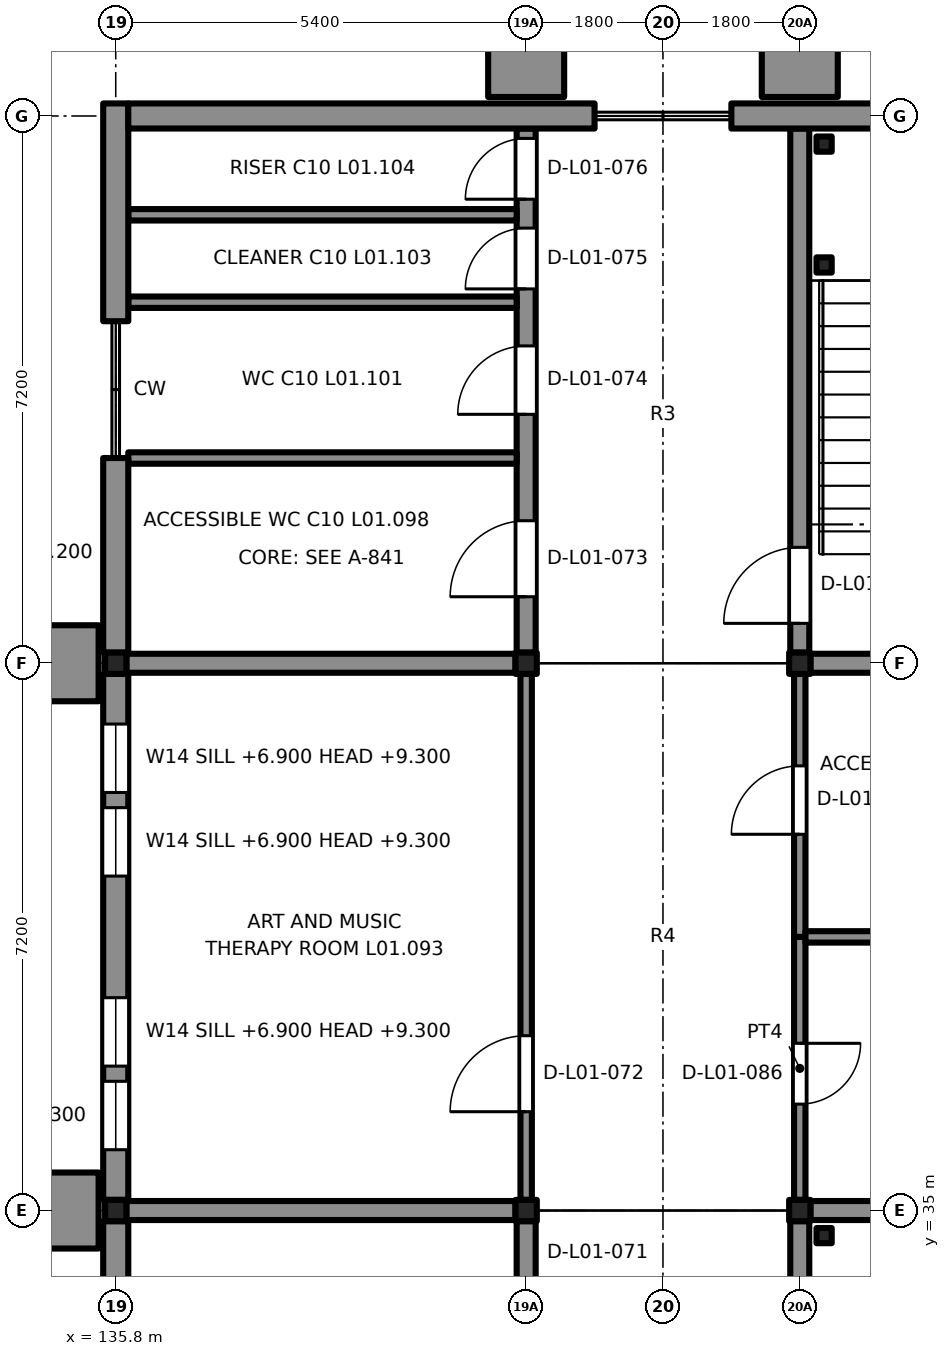
"""IFC4 building model, lengths in metres.
Left out: names, types, materials, properties, quantities, classifications, styles, units other than length and angle.
Written with IfcOpenShell. Run it as: python <this file> out.ifc"""

import sys

from ifc_helpers import new_model, si_unit, direction, frame, frame_2d, origin, origin_2d, place, context, subcontext, project, spatial, rectangle, extrude, element, fill, save


model = new_model("IFC4")
c1 = context("Model", 3, precision=1e-05, world=origin(), true_north=direction((0.0, 1.0)))
c2 = subcontext(c1, "Body", "Model", "MODEL_VIEW")
j1 = project(units=[si_unit("LENGTHUNIT", "METRE"), si_unit("PLANEANGLEUNIT", "RADIAN")], contexts=[c1])
p1 = place(None, origin())
s1 = spatial("IfcSite", under=j1, at=p1, CompositionType="ELEMENT")
p2 = place(p1, origin())
s2 = spatial("IfcBuilding", under=s1, at=p2, CompositionType="ELEMENT")
p3 = place(p2, frame((0.0, 0.0, 6.3)))
s3 = spatial("IfcBuildingStorey", under=s2, at=p3, CompositionType="ELEMENT", Elevation=6.3)
for number, where, z_axis, x_axis in (
    (1, (135.8, 35.0, 0.0), (0.0, 0.0, 1.0), (1.0, 0.0, 0.0)),
    (2, (141.2, 35.0, 0.0), (0.0, 0.0, 1.0), (1.0, 0.0, 0.0)),
    (3, (144.8, 35.0, 0.0), (0.0, 0.0, 1.0), (1.0, 0.0, 0.0)),
    (4, (135.8, 42.2, 0.0), (0.0, 0.0, 1.0), (1.0, 0.0, 0.0)),
    (5, (141.2, 42.2, 0.0), (0.0, 0.0, 1.0), (1.0, 0.0, 0.0)),
    (6, (144.8, 42.2, 0.0), (0.0, 0.0, 1.0), (1.0, 0.0, 0.0)),
):
    element("IfcColumn", number, at=place(p3, frame(where, z_axis=z_axis, x_axis=x_axis)), inside=s3, PredefinedType="COLUMN", context=c2, shape_type="SweptSolid", body=[
        extrude(rectangle(XDim=0.28, YDim=0.28, at=origin_2d()), origin(), (0.0, 0.0, 1.0), 3.9),
    ])
p4 = place(p3, frame((144.8, 27.94, 0.0), z_axis=(0.0, 0.0, 1.0), x_axis=(0.0, 1.0, 0.0)))
e7 = element("IfcWall", 7, at=p4, inside=s3, PredefinedType="SHEAR", context=c2, shape_type="SweptSolid", body=[
    extrude(rectangle(XDim=6.92, YDim=0.25, at=frame_2d((3.46, 0.0))), origin(), (0.0, 0.0, 1.0), 3.65),
])
p5 = place(p4, frame((0.335, 0.0, 0.0)))
e8 = element("IfcOpeningElement", 8, at=p5, cuts=e7, PredefinedType="OPENING", context=c2, shape_type="SweptSolid", body=[
    extrude(rectangle(XDim=1.0, YDim=2.1, at=frame_2d((0.5, 1.05))), frame((0.0, 0.135, 0.0), z_axis=(0.0, -1.0, 0.0), x_axis=(1.0, 0.0, 0.0)), (0.0, 0.0, 1.0), 0.27),
])
p6 = place(p3, frame((144.94, 35.0, 0.0), z_axis=(0.0, 0.0, 1.0), x_axis=(1.0, 0.0, 0.0)))
e9 = element("IfcWall", 9, at=p6, inside=s3, PredefinedType="SHEAR", context=c2, shape_type="SweptSolid", body=[
    extrude(rectangle(XDim=5.12, YDim=0.25, at=frame_2d((2.56, 0.0))), origin(), (0.0, 0.0, 1.0), 3.65),
])
p7 = place(p3, frame((141.2, 27.94, 0.0), z_axis=(0.0, 0.0, 1.0), x_axis=(0.0, 1.0, 0.0)))
e10 = element("IfcWall", 10, at=p7, inside=s3, PredefinedType="SHEAR", context=c2, shape_type="SweptSolid", body=[
    extrude(rectangle(XDim=6.92, YDim=0.25, at=frame_2d((3.46, 0.0))), origin(), (0.0, 0.0, 1.0), 3.65),
])
p8 = place(p7, frame((4.16, 0.0, 0.0)))
e11 = element("IfcOpeningElement", 11, at=p8, cuts=e10, PredefinedType="OPENING", context=c2, shape_type="SweptSolid", body=[
    extrude(rectangle(XDim=1.8, YDim=2.1, at=frame_2d((0.9, 1.05))), frame((0.0, 0.135, 0.0), z_axis=(0.0, -1.0, 0.0), x_axis=(1.0, 0.0, 0.0)), (0.0, 0.0, 1.0), 0.27),
])
p9 = place(p3, frame((135.94, 35.0, 0.0), z_axis=(0.0, 0.0, 1.0), x_axis=(1.0, 0.0, 0.0)))
e12 = element("IfcWall", 12, at=p9, inside=s3, PredefinedType="SHEAR", context=c2, shape_type="SweptSolid", body=[
    extrude(rectangle(XDim=5.12, YDim=0.25, at=frame_2d((2.56, 0.0))), origin(), (0.0, 0.0, 1.0), 3.65),
])
p10 = place(p3, frame((145.12, 34.67, 0.0), z_axis=(0.0, 0.0, 1.0), x_axis=(1.0, 0.0, 0.0)))
e13 = element("IfcColumn", 13, at=p10, inside=s3, PredefinedType="COLUMN", context=c2, shape_type="SweptSolid", body=[
    extrude(rectangle(XDim=0.2, YDim=0.2, at=origin_2d()), origin(), (0.0, 0.0, 1.0), 1.75),
])
p11 = place(p3, frame((144.8, 42.34, 0.0), z_axis=(0.0, 0.0, 1.0), x_axis=(0.0, 1.0, 0.0)))
e14 = element("IfcWall", 14, at=p11, inside=s3, PredefinedType="SHEAR", context=c2, shape_type="SweptSolid", body=[
    extrude(rectangle(XDim=6.895, YDim=0.25, at=frame_2d((3.448, 0.0))), origin(), (0.0, 0.0, 1.0), 3.65),
])
p12 = place(p11, frame((0.385, 0.0, 0.0)))
e15 = element("IfcOpeningElement", 15, at=p12, cuts=e14, PredefinedType="OPENING", context=c2, shape_type="SweptSolid", body=[
    extrude(rectangle(XDim=1.0, YDim=2.1, at=frame_2d((0.5, 1.05))), frame((0.0, 0.135, 0.0), z_axis=(0.0, -1.0, 0.0), x_axis=(1.0, 0.0, 0.0)), (0.0, 0.0, 1.0), 0.27),
])
p13 = place(p3, frame((144.94, 42.2, 0.0), z_axis=(0.0, 0.0, 1.0), x_axis=(1.0, 0.0, 0.0)))
e16 = element("IfcWall", 16, at=p13, inside=s3, PredefinedType="SHEAR", context=c2, shape_type="SweptSolid", body=[
    extrude(rectangle(XDim=5.12, YDim=0.25, at=frame_2d((2.56, 0.0))), origin(), (0.0, 0.0, 1.0), 3.65),
])
p14 = place(p3, frame((141.2, 42.34, 0.0), z_axis=(0.0, 0.0, 1.0), x_axis=(0.0, 1.0, 0.0)))
e17 = element("IfcWall", 17, at=p14, inside=s3, PredefinedType="SHEAR", context=c2, shape_type="SweptSolid", body=[
    extrude(rectangle(XDim=6.895, YDim=0.25, at=frame_2d((3.448, 0.0))), origin(), (0.0, 0.0, 1.0), 3.65),
])
p15 = place(p14, frame((0.735, 0.0, 0.0)))
e18 = element("IfcOpeningElement", 18, at=p15, cuts=e17, PredefinedType="OPENING", context=c2, shape_type="SweptSolid", body=[
    extrude(rectangle(XDim=1.0, YDim=2.1, at=frame_2d((0.5, 1.05))), frame((0.0, 0.135, 0.0), z_axis=(0.0, -1.0, 0.0), x_axis=(1.0, 0.0, 0.0)), (0.0, 0.0, 1.0), 0.27),
])
p16 = place(p14, frame((3.135, 0.0, 0.0)))
e19 = element("IfcOpeningElement", 19, at=p16, cuts=e17, PredefinedType="OPENING", context=c2, shape_type="SweptSolid", body=[
    extrude(rectangle(XDim=0.9, YDim=2.1, at=frame_2d((0.45, 1.05))), frame((0.0, 0.135, 0.0), z_axis=(0.0, -1.0, 0.0), x_axis=(1.0, 0.0, 0.0)), (0.0, 0.0, 1.0), 0.27),
])
p17 = place(p14, frame((4.785, 0.0, 0.0)))
e20 = element("IfcOpeningElement", 20, at=p17, cuts=e17, PredefinedType="OPENING", context=c2, shape_type="SweptSolid", body=[
    extrude(rectangle(XDim=0.8, YDim=2.1, at=frame_2d((0.4, 1.05))), frame((0.0, 0.135, 0.0), z_axis=(0.0, -1.0, 0.0), x_axis=(1.0, 0.0, 0.0)), (0.0, 0.0, 1.0), 0.27),
])
p18 = place(p14, frame((5.965, 0.0, 0.0)))
e21 = element("IfcOpeningElement", 21, at=p18, cuts=e17, PredefinedType="OPENING", context=c2, shape_type="SweptSolid", body=[
    extrude(rectangle(XDim=0.8, YDim=2.1, at=frame_2d((0.4, 1.05))), frame((0.0, 0.135, 0.0), z_axis=(0.0, -1.0, 0.0), x_axis=(1.0, 0.0, 0.0)), (0.0, 0.0, 1.0), 0.27),
])
p19 = place(p3, frame((135.94, 42.2, 0.0), z_axis=(0.0, 0.0, 1.0), x_axis=(1.0, 0.0, 0.0)))
e22 = element("IfcWall", 22, at=p19, inside=s3, PredefinedType="SHEAR", context=c2, shape_type="SweptSolid", body=[
    extrude(rectangle(XDim=5.12, YDim=0.25, at=frame_2d((2.56, 0.0))), origin(), (0.0, 0.0, 1.0), 3.65),
])
for number, where, z_axis, x_axis in (
    (23, (135.965, 44.9, 0.0), (0.0, 0.0, 1.0), (1.0, 0.0, 0.0)),
    (24, (135.965, 46.95, 0.0), (0.0, 0.0, 1.0), (1.0, 0.0, 0.0)),
    (25, (135.965, 48.1, 0.0), (0.0, 0.0, 1.0), (1.0, 0.0, 0.0)),
):
    element("IfcWall", number, at=place(p3, frame(where, z_axis=z_axis, x_axis=x_axis)), inside=s3, PredefinedType="PARTITIONING", context=c2, shape_type="SweptSolid", body=[
        extrude(rectangle(XDim=5.11, YDim=0.15, at=frame_2d((2.555, 0.0))), origin(), (0.0, 0.0, 1.0), 3.65),
    ])
for number, where, z_axis, x_axis in (
    (26, (145.12, 49.03, 0.0), (0.0, 0.0, 1.0), (1.0, 0.0, 0.0)),
    (27, (145.12, 47.44, 0.0), (0.0, 0.0, 1.0), (1.0, 0.0, 0.0)),
):
    element("IfcColumn", number, at=place(p3, frame(where, z_axis=z_axis, x_axis=x_axis)), inside=s3, PredefinedType="COLUMN", context=c2, shape_type="SweptSolid", body=[
        extrude(rectangle(XDim=0.2, YDim=0.2, at=origin_2d()), origin(), (0.0, 0.0, 1.0), 1.75),
    ])
p20 = place(p3, frame((135.8, 27.94, 0.0), z_axis=(0.0, 0.0, 1.0), x_axis=(0.0, 1.0, 0.0)))
e28 = element("IfcWall", 28, at=p20, inside=s3, PredefinedType="SOLIDWALL", context=c2, shape_type="SweptSolid", body=[
    extrude(rectangle(XDim=6.92, YDim=0.33, at=frame_2d((3.46, 0.0))), origin(), (0.0, 0.0, 1.0), 3.22),
])
p21 = place(p3, frame((135.8, 35.14, 0.0), z_axis=(0.0, 0.0, 1.0), x_axis=(0.0, 1.0, 0.0)))
e29 = element("IfcWall", 29, at=p21, inside=s3, PredefinedType="SOLIDWALL", context=c2, shape_type="SweptSolid", body=[
    extrude(rectangle(XDim=6.92, YDim=0.33, at=frame_2d((3.46, 0.0))), origin(), (0.0, 0.0, 1.0), 3.22),
])
p22 = place(p21, frame((0.66, 0.0, 0.6)))
e30 = element("IfcOpeningElement", 30, at=p22, cuts=e29, PredefinedType="OPENING", context=c2, shape_type="SweptSolid", body=[
    extrude(rectangle(XDim=0.9, YDim=2.4, at=frame_2d((0.45, 1.2))), frame((0.0, 0.175, 0.0), z_axis=(0.0, -1.0, 0.0), x_axis=(1.0, 0.0, 0.0)), (0.0, 0.0, 1.0), 0.35),
])
p23 = place(p21, frame((1.76, 0.0, 0.6)))
e31 = element("IfcOpeningElement", 31, at=p23, cuts=e29, PredefinedType="OPENING", context=c2, shape_type="SweptSolid", body=[
    extrude(rectangle(XDim=0.9, YDim=2.4, at=frame_2d((0.45, 1.2))), frame((0.0, 0.175, 0.0), z_axis=(0.0, -1.0, 0.0), x_axis=(1.0, 0.0, 0.0)), (0.0, 0.0, 1.0), 0.35),
])
p24 = place(p21, frame((4.26, 0.0, 0.6)))
e32 = element("IfcOpeningElement", 32, at=p24, cuts=e29, PredefinedType="OPENING", context=c2, shape_type="SweptSolid", body=[
    extrude(rectangle(XDim=0.9, YDim=2.4, at=frame_2d((0.45, 1.2))), frame((0.0, 0.175, 0.0), z_axis=(0.0, -1.0, 0.0), x_axis=(1.0, 0.0, 0.0)), (0.0, 0.0, 1.0), 0.35),
])
p25 = place(p21, frame((5.36, 0.0, 0.6)))
e33 = element("IfcOpeningElement", 33, at=p25, cuts=e29, PredefinedType="OPENING", context=c2, shape_type="SweptSolid", body=[
    extrude(rectangle(XDim=0.9, YDim=2.4, at=frame_2d((0.45, 1.2))), frame((0.0, 0.175, 0.0), z_axis=(0.0, -1.0, 0.0), x_axis=(1.0, 0.0, 0.0)), (0.0, 0.0, 1.0), 0.35),
])
p26 = place(p3, frame((135.8, 42.34, 0.0), z_axis=(0.0, 0.0, 1.0), x_axis=(0.0, 1.0, 0.0)))
e34 = element("IfcWall", 34, at=p26, inside=s3, PredefinedType="SOLIDWALL", context=c2, shape_type="SweptSolid", body=[
    extrude(rectangle(XDim=2.56, YDim=0.33, at=frame_2d((1.28, 0.0))), origin(), (0.0, 0.0, 1.0), 3.22),
])
p27 = place(p3, frame((135.8, 46.7, 0.0), z_axis=(0.0, 0.0, 1.0), x_axis=(0.0, 1.0, 0.0)))
e35 = element("IfcWall", 35, at=p27, inside=s3, PredefinedType="SOLIDWALL", context=c2, shape_type="SweptSolid", body=[
    extrude(rectangle(XDim=2.865, YDim=0.33, at=frame_2d((1.433, 0.0))), origin(), (0.0, 0.0, 1.0), 3.22),
])
for number, where, z_axis, x_axis in (
    (36, (135.2, 34.5, 0.0), (0.0, 0.0, 1.0), (0.0, 1.0, 0.0)),
    (37, (135.2, 41.7, 0.0), (0.0, 0.0, 1.0), (0.0, 1.0, 0.0)),
):
    element("IfcWall", number, at=place(p3, frame(where, z_axis=z_axis, x_axis=x_axis)), inside=s3, PredefinedType="SOLIDWALL", context=c2, shape_type="SweptSolid", body=[
        extrude(rectangle(XDim=1.0, YDim=0.75, at=frame_2d((0.5, 0.0))), origin(), (0.0, 0.0, 1.0), 3.9),
    ])
p28 = place(p3, frame((135.965, 49.4, 0.0), z_axis=(0.0, 0.0, 1.0), x_axis=(1.0, 0.0, 0.0)))
e38 = element("IfcWall", 38, at=p28, inside=s3, PredefinedType="SOLIDWALL", context=c2, shape_type="SweptSolid", body=[
    extrude(rectangle(XDim=6.135, YDim=0.33, at=frame_2d((3.067, 0.0))), origin(), (0.0, 0.0, 1.0), 3.2),
])
p29 = place(p3, frame((143.9, 49.4, 0.0), z_axis=(0.0, 0.0, 1.0), x_axis=(1.0, 0.0, 0.0)))
e39 = element("IfcWall", 39, at=p29, inside=s3, PredefinedType="SOLIDWALL", context=c2, shape_type="SweptSolid", body=[
    extrude(rectangle(XDim=2.98, YDim=0.33, at=frame_2d((1.49, 0.0))), origin(), (0.0, 0.0, 1.0), 3.2),
])
for number, where, z_axis, x_axis in (
    (40, (140.7, 50.025, 0.0), (0.0, 0.0, 1.0), (1.0, 0.0, 0.0)),
    (41, (144.3, 50.025, 0.0), (0.0, 0.0, 1.0), (1.0, 0.0, 0.0)),
):
    element("IfcWall", number, at=place(p3, frame(where, z_axis=z_axis, x_axis=x_axis)), inside=s3, PredefinedType="SOLIDWALL", context=c2, shape_type="SweptSolid", body=[
        extrude(rectangle(XDim=1.0, YDim=0.75, at=frame_2d((0.5, 0.0))), origin(), (0.0, 0.0, 1.0), 3.9),
    ])
p30 = place(p3, frame((141.2, 35.14, 0.0), z_axis=(0.0, 0.0, 1.0), x_axis=(0.0, 1.0, 0.0)))
e42 = element("IfcWall", 42, at=p30, inside=s3, PredefinedType="PARTITIONING", context=c2, shape_type="SweptSolid", body=[
    extrude(rectangle(XDim=6.92, YDim=0.15, at=frame_2d((3.46, 0.0))), origin(), (0.0, 0.0, 1.0), 3.22),
])
p31 = place(p30, frame((1.16, 0.0, 0.0)))
e43 = element("IfcOpeningElement", 43, at=p31, cuts=e42, PredefinedType="OPENING", context=c2, shape_type="SweptSolid", body=[
    extrude(rectangle(XDim=1.0, YDim=2.1, at=frame_2d((0.5, 1.05))), frame((0.0, 0.085, 0.0), z_axis=(0.0, -1.0, 0.0), x_axis=(1.0, 0.0, 0.0)), (0.0, 0.0, 1.0), 0.17),
])
p32 = place(p3, frame((144.8, 38.6, 0.0), z_axis=(0.0, 0.0, 1.0), x_axis=(0.0, -1.0, 0.0)))
e44 = element("IfcWall", 44, at=p32, inside=s3, PredefinedType="PARTITIONING", context=c2, shape_type="SweptSolid", body=[
    extrude(rectangle(XDim=3.46, YDim=0.15, at=frame_2d((1.73, 0.0))), origin(), (0.0, 0.0, 1.0), 3.22),
])
p33 = place(p32, frame((1.4, 0.0, 0.0)))
e45 = element("IfcOpeningElement", 45, at=p33, cuts=e44, PredefinedType="OPENING", context=c2, shape_type="SweptSolid", body=[
    extrude(rectangle(XDim=0.8, YDim=2.1, at=frame_2d((0.4, 1.05))), frame((0.0, 0.085, 0.0), z_axis=(0.0, -1.0, 0.0), x_axis=(1.0, 0.0, 0.0)), (0.0, 0.0, 1.0), 0.17),
])
p34 = place(p3, frame((144.8, 38.6, 0.0), z_axis=(0.0, 0.0, 1.0), x_axis=(0.0, 1.0, 0.0)))
e46 = element("IfcWall", 46, at=p34, inside=s3, PredefinedType="PARTITIONING", context=c2, shape_type="SweptSolid", body=[
    extrude(rectangle(XDim=3.46, YDim=0.15, at=frame_2d((1.73, 0.0))), origin(), (0.0, 0.0, 1.0), 3.22),
])
p35 = place(p34, frame((1.35, 0.0, 0.0)))
e47 = element("IfcOpeningElement", 47, at=p35, cuts=e46, PredefinedType="OPENING", context=c2, shape_type="SweptSolid", body=[
    extrude(rectangle(XDim=0.9, YDim=2.1, at=frame_2d((0.45, 1.05))), frame((0.0, 0.085, 0.0), z_axis=(0.0, -1.0, 0.0), x_axis=(1.0, 0.0, 0.0)), (0.0, 0.0, 1.0), 0.17),
])
p36 = place(p3, frame((150.035, 38.6, 0.0), z_axis=(0.0, 0.0, 1.0), x_axis=(-1.0, 0.0, 0.0)))
e48 = element("IfcWall", 48, at=p36, inside=s3, PredefinedType="PARTITIONING", context=c2, shape_type="SweptSolid", body=[
    extrude(rectangle(XDim=5.16, YDim=0.15, at=frame_2d((2.58, 0.0))), origin(), (0.0, 0.0, 1.0), 3.38),
])
p37 = place(p12, origin())
e49 = element("IfcDoor", 49, at=p37, inside=s3, OperationType="SINGLE_SWING_RIGHT", PredefinedType="DOOR", context=c2, shape_type="SweptSolid", body=[
    extrude(rectangle(XDim=1.0, YDim=2.1, at=frame_2d((0.5, 1.05))), frame((0.0, 0.025, 0.0), z_axis=(0.0, -1.0, 0.0), x_axis=(1.0, 0.0, 0.0)), (0.0, 0.0, 1.0), 0.05),
])
fill(e15, e49)
p38 = place(p15, origin())
e50 = element("IfcDoor", 50, at=p38, inside=s3, OperationType="SINGLE_SWING_LEFT", PredefinedType="DOOR", context=c2, shape_type="SweptSolid", body=[
    extrude(rectangle(XDim=1.0, YDim=2.1, at=frame_2d((0.5, 1.05))), frame((0.0, 0.025, 0.0), z_axis=(0.0, -1.0, 0.0), x_axis=(1.0, 0.0, 0.0)), (0.0, 0.0, 1.0), 0.05),
])
fill(e18, e50)
p39 = place(p16, origin())
e51 = element("IfcDoor", 51, at=p39, inside=s3, OperationType="SINGLE_SWING_LEFT", PredefinedType="DOOR", context=c2, shape_type="SweptSolid", body=[
    extrude(rectangle(XDim=0.9, YDim=2.1, at=frame_2d((0.45, 1.05))), frame((0.0, 0.025, 0.0), z_axis=(0.0, -1.0, 0.0), x_axis=(1.0, 0.0, 0.0)), (0.0, 0.0, 1.0), 0.05),
])
fill(e19, e51)
p40 = place(p17, origin())
e52 = element("IfcDoor", 52, at=p40, inside=s3, OperationType="SINGLE_SWING_LEFT", PredefinedType="DOOR", context=c2, shape_type="SweptSolid", body=[
    extrude(rectangle(XDim=0.8, YDim=2.1, at=frame_2d((0.4, 1.05))), frame((0.0, 0.025, 0.0), z_axis=(0.0, -1.0, 0.0), x_axis=(1.0, 0.0, 0.0)), (0.0, 0.0, 1.0), 0.05),
])
fill(e20, e52)
p41 = place(p18, origin())
e53 = element("IfcDoor", 53, at=p41, inside=s3, OperationType="SINGLE_SWING_LEFT", PredefinedType="DOOR", context=c2, shape_type="SweptSolid", body=[
    extrude(rectangle(XDim=0.8, YDim=2.1, at=frame_2d((0.4, 1.05))), frame((0.0, 0.025, 0.0), z_axis=(0.0, -1.0, 0.0), x_axis=(1.0, 0.0, 0.0)), (0.0, 0.0, 1.0), 0.05),
])
fill(e21, e53)
p42 = place(p22, origin())
e54 = element("IfcWindow", 54, at=p42, inside=s3, PartitioningType="SINGLE_PANEL", PredefinedType="WINDOW", context=c2, shape_type="SweptSolid", body=[
    extrude(rectangle(XDim=0.9, YDim=2.4, at=frame_2d((0.45, 1.2))), frame((0.0, -0.03, 0.0), z_axis=(0.0, -1.0, 0.0), x_axis=(1.0, 0.0, 0.0)), (0.0, 0.0, 1.0), 0.06),
])
fill(e30, e54)
p43 = place(p23, origin())
e55 = element("IfcWindow", 55, at=p43, inside=s3, PartitioningType="SINGLE_PANEL", PredefinedType="WINDOW", context=c2, shape_type="SweptSolid", body=[
    extrude(rectangle(XDim=0.9, YDim=2.4, at=frame_2d((0.45, 1.2))), frame((0.0, -0.03, 0.0), z_axis=(0.0, -1.0, 0.0), x_axis=(1.0, 0.0, 0.0)), (0.0, 0.0, 1.0), 0.06),
])
fill(e31, e55)
p44 = place(p24, origin())
e56 = element("IfcWindow", 56, at=p44, inside=s3, PartitioningType="SINGLE_PANEL", PredefinedType="WINDOW", context=c2, shape_type="SweptSolid", body=[
    extrude(rectangle(XDim=0.9, YDim=2.4, at=frame_2d((0.45, 1.2))), frame((0.0, -0.03, 0.0), z_axis=(0.0, -1.0, 0.0), x_axis=(1.0, 0.0, 0.0)), (0.0, 0.0, 1.0), 0.06),
])
fill(e32, e56)
p45 = place(p25, origin())
e57 = element("IfcWindow", 57, at=p45, inside=s3, PartitioningType="SINGLE_PANEL", PredefinedType="WINDOW", context=c2, shape_type="SweptSolid", body=[
    extrude(rectangle(XDim=0.9, YDim=2.4, at=frame_2d((0.45, 1.2))), frame((0.0, -0.03, 0.0), z_axis=(0.0, -1.0, 0.0), x_axis=(1.0, 0.0, 0.0)), (0.0, 0.0, 1.0), 0.06),
])
fill(e33, e57)
p46 = place(p31, origin())
e58 = element("IfcDoor", 58, at=p46, inside=s3, OperationType="SINGLE_SWING_LEFT", PredefinedType="DOOR", context=c2, shape_type="SweptSolid", body=[
    extrude(rectangle(XDim=1.0, YDim=2.1, at=frame_2d((0.5, 1.05))), frame((0.0, 0.025, 0.0), z_axis=(0.0, -1.0, 0.0), x_axis=(1.0, 0.0, 0.0)), (0.0, 0.0, 1.0), 0.05),
])
fill(e43, e58)
p47 = place(p33, origin())
e59 = element("IfcDoor", 59, at=p47, inside=s3, OperationType="SINGLE_SWING_RIGHT", PredefinedType="DOOR", context=c2, shape_type="SweptSolid", body=[
    extrude(rectangle(XDim=0.8, YDim=2.1, at=frame_2d((0.4, 1.05))), frame((0.0, 0.025, 0.0), z_axis=(0.0, -1.0, 0.0), x_axis=(1.0, 0.0, 0.0)), (0.0, 0.0, 1.0), 0.05),
])
fill(e45, e59)
p48 = place(p35, origin())
e60 = element("IfcDoor", 60, at=p48, inside=s3, OperationType="SINGLE_SWING_RIGHT", PredefinedType="DOOR", context=c2, shape_type="SweptSolid", body=[
    extrude(rectangle(XDim=0.9, YDim=2.1, at=frame_2d((0.45, 1.05))), frame((0.0, 0.025, 0.0), z_axis=(0.0, -1.0, 0.0), x_axis=(1.0, 0.0, 0.0)), (0.0, 0.0, 1.0), 0.05),
])
fill(e47, e60)
save(model, sys.argv[1])
